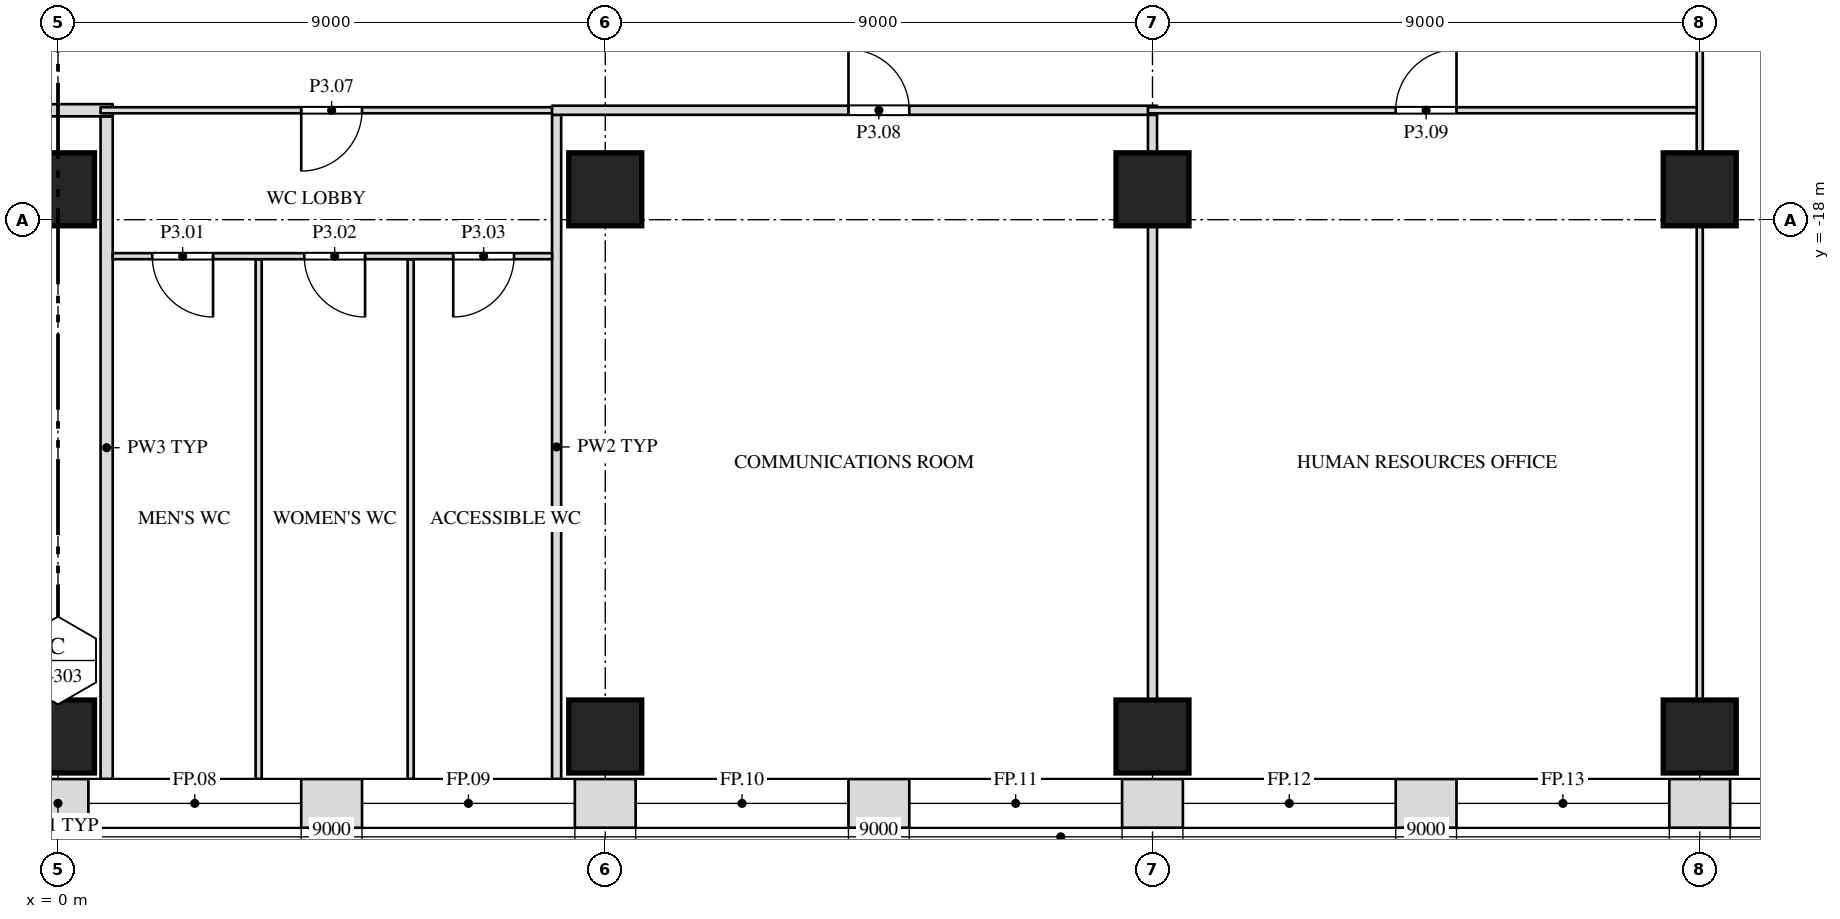
"""IFC4 building model, lengths in metres.
Left out: names, types, materials, properties, quantities, classifications, styles, units other than length and angle.
Written with IfcOpenShell. Run it as: python <this file> out.ifc"""

import sys

from ifc_helpers import new_model, si_unit, direction, frame, frame_2d, origin, origin_2d, place, context, subcontext, project, spatial, rectangle, extrude, element, fill, save


model = new_model("IFC4")
c1 = context("Model", 3, precision=1e-05, world=origin(), true_north=direction((0.0, 1.0)))
c2 = subcontext(c1, "Body", "Model", "MODEL_VIEW")
j1 = project(units=[si_unit("LENGTHUNIT", "METRE"), si_unit("PLANEANGLEUNIT", "RADIAN")], contexts=[c1])
p1 = place(None, origin())
s1 = spatial("IfcSite", under=j1, at=p1, CompositionType="ELEMENT")
p2 = place(p1, origin())
s2 = spatial("IfcBuilding", under=s1, at=p2, CompositionType="ELEMENT")
p3 = place(p2, frame((0.0, 0.0, 21.0)))
s3 = spatial("IfcBuildingStorey", under=s2, at=p3, CompositionType="ELEMENT", Elevation=21.0)
for number, where, z_axis, x_axis in (
    (1, (0.0, -26.5, 0.0), (0.0, 0.0, 1.0), (1.0, 0.0, 0.0)),
    (2, (9.0, -26.5, 0.0), (0.0, 0.0, 1.0), (1.0, 0.0, 0.0)),
    (3, (18.0, -26.5, 0.0), (0.0, 0.0, 1.0), (1.0, 0.0, 0.0)),
    (4, (27.0, -26.5, 0.0), (0.0, 0.0, 1.0), (1.0, 0.0, 0.0)),
    (5, (0.0, -17.5, 0.0), (0.0, 0.0, 1.0), (1.0, 0.0, 0.0)),
    (6, (9.0, -17.5, 0.0), (0.0, 0.0, 1.0), (1.0, 0.0, 0.0)),
    (7, (18.0, -17.5, 0.0), (0.0, 0.0, 1.0), (1.0, 0.0, 0.0)),
    (8, (27.0, -17.5, 0.0), (0.0, 0.0, 1.0), (1.0, 0.0, 0.0)),
):
    element("IfcColumn", number, at=place(p3, frame(where, z_axis=z_axis, x_axis=x_axis)), inside=s3, PredefinedType="COLUMN", context=c2, shape_type="SweptSolid", body=[
        extrude(rectangle(XDim=1.2, YDim=1.2, at=origin_2d()), origin(), (0.0, 0.0, 1.0), 6.0),
    ])
p4 = place(p3, frame((0.8, -27.2, 0.0), z_axis=(0.0, 0.0, 1.0), x_axis=(0.0, 1.0, 0.0)))
e9 = element("IfcWall", 9, at=p4, inside=s3, PredefinedType="PARTITIONING", context=c2, shape_type="SweptSolid", body=[
    extrude(rectangle(XDim=10.9, YDim=0.2, at=frame_2d((5.45, 0.0))), origin(), (0.0, 0.0, 1.0), 5.7),
])
for number, where, z_axis, x_axis in (
    (10, (3.3, -27.2, 0.0), (0.0, 0.0, 1.0), (0.0, 1.0, 0.0)),
    (11, (5.8, -27.2, 0.0), (0.0, 0.0, 1.0), (0.0, 1.0, 0.0)),
):
    element("IfcWall", number, at=place(p3, frame(where, z_axis=z_axis, x_axis=x_axis)), inside=s3, PredefinedType="PARTITIONING", context=c2, shape_type="SweptSolid", body=[
        extrude(rectangle(XDim=8.55, YDim=0.1, at=frame_2d((4.275, 0.0))), origin(), (0.0, 0.0, 1.0), 5.7),
    ])
p5 = place(p3, frame((8.2, -27.2, 0.0), z_axis=(0.0, 0.0, 1.0), x_axis=(0.0, 1.0, 0.0)))
e12 = element("IfcWall", 12, at=p5, inside=s3, PredefinedType="PARTITIONING", context=c2, shape_type="SweptSolid", body=[
    extrude(rectangle(XDim=10.925, YDim=0.15, at=frame_2d((5.462, 0.0))), origin(), (0.0, 0.0, 1.0), 5.7),
])
p6 = place(p3, frame((18.0, -25.9, 0.0), z_axis=(0.0, 0.0, 1.0), x_axis=(0.0, 1.0, 0.0)))
e13 = element("IfcWall", 13, at=p6, inside=s3, PredefinedType="PARTITIONING", context=c2, shape_type="SweptSolid", body=[
    extrude(rectangle(XDim=7.8, YDim=0.15, at=frame_2d((3.9, 0.0))), origin(), (0.0, 0.0, 1.0), 5.088),
])
p7 = place(p3, frame((18.0, -16.9, 0.0), z_axis=(0.0, 0.0, 1.0), x_axis=(0.0, 1.0, 0.0)))
e14 = element("IfcWall", 14, at=p7, inside=s3, PredefinedType="PARTITIONING", context=c2, shape_type="SweptSolid", body=[
    extrude(rectangle(XDim=0.625, YDim=0.15, at=frame_2d((0.312, 0.0))), origin(), (0.0, 0.0, 1.0), 5.7),
])
p8 = place(p3, frame((27.0, -25.9, 0.0), z_axis=(0.0, 0.0, 1.0), x_axis=(0.0, 1.0, 0.0)))
e15 = element("IfcWall", 15, at=p8, inside=s3, PredefinedType="PARTITIONING", context=c2, shape_type="SweptSolid", body=[
    extrude(rectangle(XDim=7.8, YDim=0.1, at=frame_2d((3.9, 0.0))), origin(), (0.0, 0.0, 1.0), 5.088),
])
p9 = place(p3, frame((27.0, -16.9, 0.0), z_axis=(0.0, 0.0, 1.0), x_axis=(0.0, 1.0, 0.0)))
e16 = element("IfcWall", 16, at=p9, inside=s3, PredefinedType="PARTITIONING", context=c2, shape_type="SweptSolid", body=[
    extrude(rectangle(XDim=2.85, YDim=0.1, at=frame_2d((1.425, 0.0))), origin(), (0.0, 0.0, 1.0), 5.088),
])
p10 = place(p3, frame((0.9, -18.6, 0.0), z_axis=(0.0, 0.0, 1.0), x_axis=(1.0, 0.0, 0.0)))
e17 = element("IfcWall", 17, at=p10, inside=s3, PredefinedType="PARTITIONING", context=c2, shape_type="SweptSolid", body=[
    extrude(rectangle(XDim=7.225, YDim=0.1, at=frame_2d((3.613, 0.0))), origin(), (0.0, 0.0, 1.0), 5.7),
])
p11 = place(p10, frame((0.65, 0.0, 0.0)))
e18 = element("IfcOpeningElement", 18, at=p11, cuts=e17, PredefinedType="OPENING", context=c2, shape_type="SweptSolid", body=[
    extrude(rectangle(XDim=1.0, YDim=2.1, at=frame_2d((0.5, 1.05))), frame((0.0, 0.062, 0.0), z_axis=(0.0, -1.0, 0.0), x_axis=(1.0, 0.0, 0.0)), (0.0, 0.0, 1.0), 0.124),
])
p12 = place(p10, frame((3.15, 0.0, 0.0)))
e19 = element("IfcOpeningElement", 19, at=p12, cuts=e17, PredefinedType="OPENING", context=c2, shape_type="SweptSolid", body=[
    extrude(rectangle(XDim=1.0, YDim=2.1, at=frame_2d((0.5, 1.05))), frame((0.0, 0.062, 0.0), z_axis=(0.0, -1.0, 0.0), x_axis=(1.0, 0.0, 0.0)), (0.0, 0.0, 1.0), 0.124),
])
p13 = place(p10, frame((5.6, 0.0, 0.0)))
e20 = element("IfcOpeningElement", 20, at=p13, cuts=e17, PredefinedType="OPENING", context=c2, shape_type="SweptSolid", body=[
    extrude(rectangle(XDim=1.0, YDim=2.1, at=frame_2d((0.5, 1.05))), frame((0.0, 0.062, 0.0), z_axis=(0.0, -1.0, 0.0), x_axis=(1.0, 0.0, 0.0)), (0.0, 0.0, 1.0), 0.124),
])
p14 = place(p3, frame((-9.1, -16.2, 0.0), z_axis=(0.0, 0.0, 1.0), x_axis=(1.0, 0.0, 0.0)))
e21 = element("IfcWall", 21, at=p14, inside=s3, PredefinedType="PARTITIONING", context=c2, shape_type="SweptSolid", body=[
    extrude(rectangle(XDim=10.0, YDim=0.2, at=frame_2d((5.0, 0.0))), origin(), (0.0, 0.0, 1.0), 5.7),
])
p15 = place(p14, frame((4.1, 0.0, 0.0)))
e22 = element("IfcOpeningElement", 22, at=p15, cuts=e21, PredefinedType="OPENING", context=c2, shape_type="SweptSolid", body=[
    extrude(rectangle(XDim=1.0, YDim=2.1, at=frame_2d((0.5, 1.05))), frame((0.0, 0.112, 0.0), z_axis=(0.0, -1.0, 0.0), x_axis=(1.0, 0.0, 0.0)), (0.0, 0.0, 1.0), 0.224),
])
p16 = place(p3, frame((0.7, -16.2, 0.0), z_axis=(0.0, 0.0, 1.0), x_axis=(1.0, 0.0, 0.0)))
e23 = element("IfcWall", 23, at=p16, inside=s3, PredefinedType="PARTITIONING", context=c2, shape_type="SweptSolid", body=[
    extrude(rectangle(XDim=7.575, YDim=0.1, at=frame_2d((3.788, 0.0))), origin(), (0.0, 0.0, 1.0), 5.7),
])
p17 = place(p16, frame((3.3, 0.0, 0.0)))
e24 = element("IfcOpeningElement", 24, at=p17, cuts=e23, PredefinedType="OPENING", context=c2, shape_type="SweptSolid", body=[
    extrude(rectangle(XDim=1.0, YDim=2.1, at=frame_2d((0.5, 1.05))), frame((0.0, 0.062, 0.0), z_axis=(0.0, -1.0, 0.0), x_axis=(1.0, 0.0, 0.0)), (0.0, 0.0, 1.0), 0.124),
])
p18 = place(p3, frame((8.125, -16.2, 0.0), z_axis=(0.0, 0.0, 1.0), x_axis=(1.0, 0.0, 0.0)))
e25 = element("IfcWall", 25, at=p18, inside=s3, PredefinedType="PARTITIONING", context=c2, shape_type="SweptSolid", body=[
    extrude(rectangle(XDim=9.95, YDim=0.15, at=frame_2d((4.975, 0.0))), origin(), (0.0, 0.0, 1.0), 5.7),
])
p19 = place(p18, frame((4.875, 0.0, 0.0)))
e26 = element("IfcOpeningElement", 26, at=p19, cuts=e25, PredefinedType="OPENING", context=c2, shape_type="SweptSolid", body=[
    extrude(rectangle(XDim=1.0, YDim=2.1, at=frame_2d((0.5, 1.05))), frame((0.0, 0.087, 0.0), z_axis=(0.0, -1.0, 0.0), x_axis=(1.0, 0.0, 0.0)), (0.0, 0.0, 1.0), 0.174),
])
p20 = place(p3, frame((17.925, -16.2, 0.0), z_axis=(0.0, 0.0, 1.0), x_axis=(1.0, 0.0, 0.0)))
e27 = element("IfcWall", 27, at=p20, inside=s3, PredefinedType="PARTITIONING", context=c2, shape_type="SweptSolid", body=[
    extrude(rectangle(XDim=9.025, YDim=0.1, at=frame_2d((4.512, 0.0))), origin(), (0.0, 0.0, 1.0), 5.7),
])
p21 = place(p20, frame((4.075, 0.0, 0.0)))
e28 = element("IfcOpeningElement", 28, at=p21, cuts=e27, PredefinedType="OPENING", context=c2, shape_type="SweptSolid", body=[
    extrude(rectangle(XDim=1.0, YDim=2.1, at=frame_2d((0.5, 1.05))), frame((0.0, 0.062, 0.0), z_axis=(0.0, -1.0, 0.0), x_axis=(1.0, 0.0, 0.0)), (0.0, 0.0, 1.0), 0.124),
])
p22 = place(p3, frame((-32.948, -27.6, 0.0), z_axis=(0.0, 0.0, 1.0), x_axis=(1.0, 0.0, 0.0)))
e29 = element("IfcWall", 29, at=p22, inside=s3, PredefinedType="SOLIDWALL", context=c2, shape_type="SweptSolid", body=[
    extrude(rectangle(XDim=65.895, YDim=0.8, at=frame_2d((32.948, 0.0))), origin(), (0.0, 0.0, 1.0), 5.7),
])
p23 = place(p22, frame((1.948, 0.0, 1.0)))
e30 = element("IfcOpeningElement", 30, at=p23, cuts=e29, PredefinedType="OPENING", context=c2, shape_type="SweptSolid", body=[
    extrude(rectangle(XDim=3.5, YDim=4.0, at=frame_2d((1.75, 2.0))), frame((0.0, 0.412, 0.0), z_axis=(0.0, -1.0, 0.0), x_axis=(1.0, 0.0, 0.0)), (0.0, 0.0, 1.0), 0.824),
])
p24 = place(p22, frame((6.448, 0.0, 1.0)))
e31 = element("IfcOpeningElement", 31, at=p24, cuts=e29, PredefinedType="OPENING", context=c2, shape_type="SweptSolid", body=[
    extrude(rectangle(XDim=3.5, YDim=4.0, at=frame_2d((1.75, 2.0))), frame((0.0, 0.412, 0.0), z_axis=(0.0, -1.0, 0.0), x_axis=(1.0, 0.0, 0.0)), (0.0, 0.0, 1.0), 0.824),
])
p25 = place(p22, frame((10.948, 0.0, 1.0)))
e32 = element("IfcOpeningElement", 32, at=p25, cuts=e29, PredefinedType="OPENING", context=c2, shape_type="SweptSolid", body=[
    extrude(rectangle(XDim=3.5, YDim=4.0, at=frame_2d((1.75, 2.0))), frame((0.0, 0.412, 0.0), z_axis=(0.0, -1.0, 0.0), x_axis=(1.0, 0.0, 0.0)), (0.0, 0.0, 1.0), 0.824),
])
p26 = place(p22, frame((15.448, 0.0, 1.0)))
e33 = element("IfcOpeningElement", 33, at=p26, cuts=e29, PredefinedType="OPENING", context=c2, shape_type="SweptSolid", body=[
    extrude(rectangle(XDim=3.5, YDim=4.0, at=frame_2d((1.75, 2.0))), frame((0.0, 0.412, 0.0), z_axis=(0.0, -1.0, 0.0), x_axis=(1.0, 0.0, 0.0)), (0.0, 0.0, 1.0), 0.824),
])
p27 = place(p22, frame((19.948, 0.0, 1.0)))
e34 = element("IfcOpeningElement", 34, at=p27, cuts=e29, PredefinedType="OPENING", context=c2, shape_type="SweptSolid", body=[
    extrude(rectangle(XDim=3.5, YDim=4.0, at=frame_2d((1.75, 2.0))), frame((0.0, 0.412, 0.0), z_axis=(0.0, -1.0, 0.0), x_axis=(1.0, 0.0, 0.0)), (0.0, 0.0, 1.0), 0.824),
])
p28 = place(p22, frame((24.448, 0.0, 1.0)))
e35 = element("IfcOpeningElement", 35, at=p28, cuts=e29, PredefinedType="OPENING", context=c2, shape_type="SweptSolid", body=[
    extrude(rectangle(XDim=3.5, YDim=4.0, at=frame_2d((1.75, 2.0))), frame((0.0, 0.412, 0.0), z_axis=(0.0, -1.0, 0.0), x_axis=(1.0, 0.0, 0.0)), (0.0, 0.0, 1.0), 0.824),
])
p29 = place(p22, frame((28.948, 0.0, 1.0)))
e36 = element("IfcOpeningElement", 36, at=p29, cuts=e29, PredefinedType="OPENING", context=c2, shape_type="SweptSolid", body=[
    extrude(rectangle(XDim=3.5, YDim=4.0, at=frame_2d((1.75, 2.0))), frame((0.0, 0.412, 0.0), z_axis=(0.0, -1.0, 0.0), x_axis=(1.0, 0.0, 0.0)), (0.0, 0.0, 1.0), 0.824),
])
p30 = place(p22, frame((33.448, 0.0, 1.0)))
e37 = element("IfcOpeningElement", 37, at=p30, cuts=e29, PredefinedType="OPENING", context=c2, shape_type="SweptSolid", body=[
    extrude(rectangle(XDim=3.5, YDim=4.0, at=frame_2d((1.75, 2.0))), frame((0.0, 0.412, 0.0), z_axis=(0.0, -1.0, 0.0), x_axis=(1.0, 0.0, 0.0)), (0.0, 0.0, 1.0), 0.824),
])
p31 = place(p22, frame((37.948, 0.0, 1.0)))
e38 = element("IfcOpeningElement", 38, at=p31, cuts=e29, PredefinedType="OPENING", context=c2, shape_type="SweptSolid", body=[
    extrude(rectangle(XDim=3.5, YDim=4.0, at=frame_2d((1.75, 2.0))), frame((0.0, 0.412, 0.0), z_axis=(0.0, -1.0, 0.0), x_axis=(1.0, 0.0, 0.0)), (0.0, 0.0, 1.0), 0.824),
])
p32 = place(p22, frame((42.448, 0.0, 1.0)))
e39 = element("IfcOpeningElement", 39, at=p32, cuts=e29, PredefinedType="OPENING", context=c2, shape_type="SweptSolid", body=[
    extrude(rectangle(XDim=3.5, YDim=4.0, at=frame_2d((1.75, 2.0))), frame((0.0, 0.412, 0.0), z_axis=(0.0, -1.0, 0.0), x_axis=(1.0, 0.0, 0.0)), (0.0, 0.0, 1.0), 0.824),
])
p33 = place(p22, frame((46.948, 0.0, 1.0)))
e40 = element("IfcOpeningElement", 40, at=p33, cuts=e29, PredefinedType="OPENING", context=c2, shape_type="SweptSolid", body=[
    extrude(rectangle(XDim=3.5, YDim=4.0, at=frame_2d((1.75, 2.0))), frame((0.0, 0.412, 0.0), z_axis=(0.0, -1.0, 0.0), x_axis=(1.0, 0.0, 0.0)), (0.0, 0.0, 1.0), 0.824),
])
p34 = place(p22, frame((51.448, 0.0, 1.0)))
e41 = element("IfcOpeningElement", 41, at=p34, cuts=e29, PredefinedType="OPENING", context=c2, shape_type="SweptSolid", body=[
    extrude(rectangle(XDim=3.5, YDim=4.0, at=frame_2d((1.75, 2.0))), frame((0.0, 0.412, 0.0), z_axis=(0.0, -1.0, 0.0), x_axis=(1.0, 0.0, 0.0)), (0.0, 0.0, 1.0), 0.824),
])
p35 = place(p22, frame((55.948, 0.0, 1.0)))
e42 = element("IfcOpeningElement", 42, at=p35, cuts=e29, PredefinedType="OPENING", context=c2, shape_type="SweptSolid", body=[
    extrude(rectangle(XDim=3.5, YDim=4.0, at=frame_2d((1.75, 2.0))), frame((0.0, 0.412, 0.0), z_axis=(0.0, -1.0, 0.0), x_axis=(1.0, 0.0, 0.0)), (0.0, 0.0, 1.0), 0.824),
])
p36 = place(p22, frame((60.448, 0.0, 1.0)))
e43 = element("IfcOpeningElement", 43, at=p36, cuts=e29, PredefinedType="OPENING", context=c2, shape_type="SweptSolid", body=[
    extrude(rectangle(XDim=3.5, YDim=4.0, at=frame_2d((1.75, 2.0))), frame((0.0, 0.412, 0.0), z_axis=(0.0, -1.0, 0.0), x_axis=(1.0, 0.0, 0.0)), (0.0, 0.0, 1.0), 0.824),
])
p37 = place(p11, origin())
e44 = element("IfcDoor", 44, at=p37, inside=s3, OperationType="SINGLE_SWING_LEFT", PredefinedType="DOOR", context=c2, shape_type="SweptSolid", body=[
    extrude(rectangle(XDim=1.0, YDim=2.1, at=frame_2d((0.5, 1.05))), frame((0.0, 0.025, 0.0), z_axis=(0.0, -1.0, 0.0), x_axis=(1.0, 0.0, 0.0)), (0.0, 0.0, 1.0), 0.05),
])
fill(e18, e44)
p38 = place(p12, origin())
e45 = element("IfcDoor", 45, at=p38, inside=s3, OperationType="SINGLE_SWING_LEFT", PredefinedType="DOOR", context=c2, shape_type="SweptSolid", body=[
    extrude(rectangle(XDim=1.0, YDim=2.1, at=frame_2d((0.5, 1.05))), frame((0.0, 0.025, 0.0), z_axis=(0.0, -1.0, 0.0), x_axis=(1.0, 0.0, 0.0)), (0.0, 0.0, 1.0), 0.05),
])
fill(e19, e45)
p39 = place(p13, origin())
e46 = element("IfcDoor", 46, at=p39, inside=s3, OperationType="SINGLE_SWING_RIGHT", PredefinedType="DOOR", context=c2, shape_type="SweptSolid", body=[
    extrude(rectangle(XDim=1.0, YDim=2.1, at=frame_2d((0.5, 1.05))), frame((0.0, 0.025, 0.0), z_axis=(0.0, -1.0, 0.0), x_axis=(1.0, 0.0, 0.0)), (0.0, 0.0, 1.0), 0.05),
])
fill(e20, e46)
p40 = place(p17, origin())
e47 = element("IfcDoor", 47, at=p40, inside=s3, OperationType="SINGLE_SWING_RIGHT", PredefinedType="DOOR", context=c2, shape_type="SweptSolid", body=[
    extrude(rectangle(XDim=1.0, YDim=2.1, at=frame_2d((0.5, 1.05))), frame((0.0, 0.025, 0.0), z_axis=(0.0, -1.0, 0.0), x_axis=(1.0, 0.0, 0.0)), (0.0, 0.0, 1.0), 0.05),
])
fill(e24, e47)
p41 = place(p19, origin())
e48 = element("IfcDoor", 48, at=p41, inside=s3, OperationType="SINGLE_SWING_LEFT", PredefinedType="DOOR", context=c2, shape_type="SweptSolid", body=[
    extrude(rectangle(XDim=1.0, YDim=2.1, at=frame_2d((0.5, 1.05))), frame((0.0, 0.025, 0.0), z_axis=(0.0, -1.0, 0.0), x_axis=(1.0, 0.0, 0.0)), (0.0, 0.0, 1.0), 0.05),
])
fill(e26, e48)
p42 = place(p21, origin())
e49 = element("IfcDoor", 49, at=p42, inside=s3, OperationType="SINGLE_SWING_RIGHT", PredefinedType="DOOR", context=c2, shape_type="SweptSolid", body=[
    extrude(rectangle(XDim=1.0, YDim=2.1, at=frame_2d((0.5, 1.05))), frame((0.0, 0.025, 0.0), z_axis=(0.0, -1.0, 0.0), x_axis=(1.0, 0.0, 0.0)), (0.0, 0.0, 1.0), 0.05),
])
fill(e28, e49)
p43 = place(p30, origin())
e50 = element("IfcWindow", 50, at=p43, inside=s3, PartitioningType="SINGLE_PANEL", PredefinedType="WINDOW", context=c2, shape_type="SweptSolid", body=[
    extrude(rectangle(XDim=3.5, YDim=4.0, at=frame_2d((1.75, 2.0))), frame((0.0, 0.03, 0.0), z_axis=(0.0, -1.0, 0.0), x_axis=(1.0, 0.0, 0.0)), (0.0, 0.0, 1.0), 0.06),
])
fill(e37, e50)
p44 = place(p31, origin())
e51 = element("IfcWindow", 51, at=p44, inside=s3, PartitioningType="SINGLE_PANEL", PredefinedType="WINDOW", context=c2, shape_type="SweptSolid", body=[
    extrude(rectangle(XDim=3.5, YDim=4.0, at=frame_2d((1.75, 2.0))), frame((0.0, 0.03, 0.0), z_axis=(0.0, -1.0, 0.0), x_axis=(1.0, 0.0, 0.0)), (0.0, 0.0, 1.0), 0.06),
])
fill(e38, e51)
p45 = place(p32, origin())
e52 = element("IfcWindow", 52, at=p45, inside=s3, PartitioningType="SINGLE_PANEL", PredefinedType="WINDOW", context=c2, shape_type="SweptSolid", body=[
    extrude(rectangle(XDim=3.5, YDim=4.0, at=frame_2d((1.75, 2.0))), frame((0.0, 0.03, 0.0), z_axis=(0.0, -1.0, 0.0), x_axis=(1.0, 0.0, 0.0)), (0.0, 0.0, 1.0), 0.06),
])
fill(e39, e52)
p46 = place(p33, origin())
e53 = element("IfcWindow", 53, at=p46, inside=s3, PartitioningType="SINGLE_PANEL", PredefinedType="WINDOW", context=c2, shape_type="SweptSolid", body=[
    extrude(rectangle(XDim=3.5, YDim=4.0, at=frame_2d((1.75, 2.0))), frame((0.0, 0.03, 0.0), z_axis=(0.0, -1.0, 0.0), x_axis=(1.0, 0.0, 0.0)), (0.0, 0.0, 1.0), 0.06),
])
fill(e40, e53)
p47 = place(p34, origin())
e54 = element("IfcWindow", 54, at=p47, inside=s3, PartitioningType="SINGLE_PANEL", PredefinedType="WINDOW", context=c2, shape_type="SweptSolid", body=[
    extrude(rectangle(XDim=3.5, YDim=4.0, at=frame_2d((1.75, 2.0))), frame((0.0, 0.03, 0.0), z_axis=(0.0, -1.0, 0.0), x_axis=(1.0, 0.0, 0.0)), (0.0, 0.0, 1.0), 0.06),
])
fill(e41, e54)
p48 = place(p35, origin())
e55 = element("IfcWindow", 55, at=p48, inside=s3, PartitioningType="SINGLE_PANEL", PredefinedType="WINDOW", context=c2, shape_type="SweptSolid", body=[
    extrude(rectangle(XDim=3.5, YDim=4.0, at=frame_2d((1.75, 2.0))), frame((0.0, 0.03, 0.0), z_axis=(0.0, -1.0, 0.0), x_axis=(1.0, 0.0, 0.0)), (0.0, 0.0, 1.0), 0.06),
])
fill(e42, e55)
p49 = place(p36, origin())
e56 = element("IfcWindow", 56, at=p49, inside=s3, PartitioningType="SINGLE_PANEL", PredefinedType="WINDOW", context=c2, shape_type="SweptSolid", body=[
    extrude(rectangle(XDim=3.5, YDim=4.0, at=frame_2d((1.75, 2.0))), frame((0.0, 0.03, 0.0), z_axis=(0.0, -1.0, 0.0), x_axis=(1.0, 0.0, 0.0)), (0.0, 0.0, 1.0), 0.06),
])
fill(e43, e56)
save(model, sys.argv[1])
